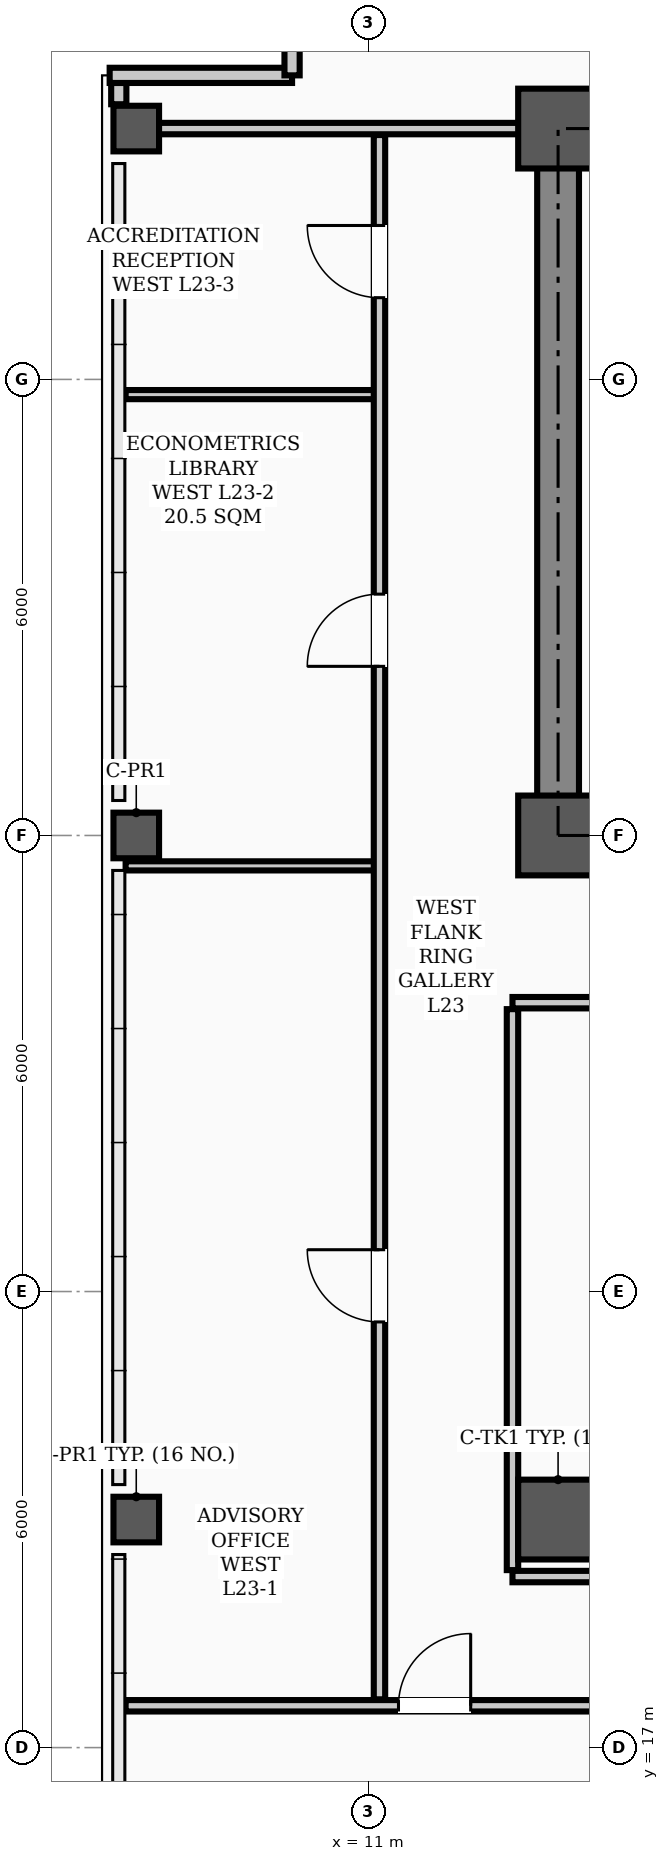
"""IFC4 building model, lengths in metres.
Left out: names, types, materials, properties, quantities, classifications, styles, units other than length and angle.
Written with IfcOpenShell. Run it as: python <this file> out.ifc"""

import sys

from ifc_helpers import new_model, si_unit, direction, frame, frame_2d, origin, origin_2d, place, context, subcontext, project, spatial, rectangle, hollow_rectangle, extrude, element, fill, save


model = new_model("IFC4")
c1 = context("Model", 3, precision=1e-05, world=origin(), true_north=direction((0.0, 1.0)))
c2 = subcontext(c1, "Body", "Model", "MODEL_VIEW")
j1 = project(units=[si_unit("LENGTHUNIT", "METRE"), si_unit("PLANEANGLEUNIT", "RADIAN")], contexts=[c1])
p1 = place(None, origin())
s1 = spatial("IfcSite", under=j1, at=p1, CompositionType="ELEMENT")
p2 = place(p1, origin())
s2 = spatial("IfcBuilding", under=s1, at=p2, CompositionType="ELEMENT")
p3 = place(p2, frame((0.0, 0.0, 92.8)))
s3 = spatial("IfcBuildingStorey", under=s2, at=p3, CompositionType="ELEMENT", Elevation=92.8)
for number, where, z_axis, x_axis in (
    (1, (13.5, 29.0, 0.0), (0.0, 0.0, 1.0), (1.0, 0.0, 0.0)),
    (2, (13.5, 38.3, 0.0), (0.0, 0.0, 1.0), (1.0, 0.0, 0.0)),
    (3, (13.5, 20.0, 0.0), (0.0, 0.0, 1.0), (1.0, 0.0, 0.0)),
):
    element("IfcColumn", number, at=place(p3, frame(where, z_axis=z_axis, x_axis=x_axis)), inside=s3, PredefinedType="COLUMN", context=c2, shape_type="SweptSolid", body=[
        extrude(hollow_rectangle(XDim=1.05, YDim=1.05, WallThickness=0.038, InnerFilletRadius=0.019, OuterFilletRadius=0.057, at=origin_2d()), origin(), (0.0, 0.0, 1.0), 3.9),
    ])
for number, where, z_axis, x_axis in (
    (4, (7.95, 20.0, 0.0), (0.0, 0.0, 1.0), (1.0, 0.0, 0.0)),
    (5, (7.95, 29.0, 0.0), (0.0, 0.0, 1.0), (1.0, 0.0, 0.0)),
    (6, (7.95, 38.3, 0.0), (0.0, 0.0, 1.0), (1.0, 0.0, 0.0)),
):
    element("IfcColumn", number, at=place(p3, frame(where, z_axis=z_axis, x_axis=x_axis)), inside=s3, PredefinedType="COLUMN", context=c2, shape_type="SweptSolid", body=[
        extrude(hollow_rectangle(XDim=0.6, YDim=0.6, WallThickness=0.026, InnerFilletRadius=0.013, OuterFilletRadius=0.039, at=origin_2d()), origin(), (0.0, 0.0, 1.0), 3.9),
    ])
p4 = place(p3, frame((7.72, 38.62, 0.0), z_axis=(0.0, 0.0, 1.0), x_axis=(0.0, 1.0, 0.0)))
e7 = element("IfcWall", 7, at=p4, inside=s3, PredefinedType="PARAPET", context=c2, shape_type="SweptSolid", body=[
    extrude(rectangle(XDim=0.28, YDim=0.2, at=frame_2d((0.14, 0.0))), origin(), (0.0, 0.0, 1.0), 1.2),
])
for number, where, z_axis, x_axis in (
    (8, (7.6, 39.0, 0.0), (0.0, 0.0, 1.0), (1.0, 0.0, 0.0)),
    (9, (10.0, 39.0, 0.0), (0.0, 0.0, 1.0), (0.0, 1.0, 0.0)),
):
    element("IfcWall", number, at=place(p3, frame(where, z_axis=z_axis, x_axis=x_axis)), inside=s3, PredefinedType="PARAPET", context=c2, shape_type="SweptSolid", body=[
        extrude(rectangle(XDim=2.4, YDim=0.2, at=frame_2d((1.2, 0.0))), origin(), (0.0, 0.0, 1.0), 1.2),
    ])
p5 = place(p3, frame((13.5, 29.0, 0.0), z_axis=(0.0, 0.0, 1.0), x_axis=(1.0, 0.0, 0.0)))
e10 = element("IfcWall", 10, at=p5, inside=s3, PredefinedType="SHEAR", context=c2, shape_type="SweptSolid", body=[
    extrude(rectangle(XDim=30.5, YDim=0.55, at=frame_2d((15.25, 0.0))), origin(), (0.0, 0.0, 1.0), 3.72),
])
p6 = place(p5, frame((1.75, 0.0, 0.0)))
e11 = element("IfcOpeningElement", 11, at=p6, cuts=e10, PredefinedType="OPENING", context=c2, shape_type="SweptSolid", body=[
    extrude(rectangle(XDim=1.1, YDim=2.08, at=frame_2d((0.55, 1.04))), frame((0.0, 0.285, 0.0), z_axis=(0.0, -1.0, 0.0), x_axis=(1.0, 0.0, 0.0)), (0.0, 0.0, 1.0), 0.57),
])
p7 = place(p5, frame((26.7, 0.0, 0.0)))
e12 = element("IfcOpeningElement", 12, at=p7, cuts=e10, PredefinedType="OPENING", context=c2, shape_type="SweptSolid", body=[
    extrude(rectangle(XDim=1.1, YDim=2.08, at=frame_2d((0.55, 1.04))), frame((0.0, 0.285, 0.0), z_axis=(0.0, -1.0, 0.0), x_axis=(1.0, 0.0, 0.0)), (0.0, 0.0, 1.0), 0.57),
])
p8 = place(p5, frame((6.8, 0.0, 0.0)))
e13 = element("IfcOpeningElement", 13, at=p8, cuts=e10, PredefinedType="OPENING", context=c2, shape_type="SweptSolid", body=[
    extrude(rectangle(XDim=1.1, YDim=2.08, at=frame_2d((0.55, 1.04))), frame((0.0, 0.285, 0.0), z_axis=(0.0, -1.0, 0.0), x_axis=(1.0, 0.0, 0.0)), (0.0, 0.0, 1.0), 0.57),
])
p9 = place(p5, frame((13.2, 0.0, 0.0)))
e14 = element("IfcOpeningElement", 14, at=p9, cuts=e10, PredefinedType="OPENING", context=c2, shape_type="SweptSolid", body=[
    extrude(rectangle(XDim=1.6, YDim=2.08, at=frame_2d((0.8, 1.04))), frame((0.0, 0.285, 0.0), z_axis=(0.0, -1.0, 0.0), x_axis=(1.0, 0.0, 0.0)), (0.0, 0.0, 1.0), 0.57),
])
p10 = place(p5, frame((19.6, 0.0, 0.0)))
e15 = element("IfcOpeningElement", 15, at=p10, cuts=e10, PredefinedType="OPENING", context=c2, shape_type="SweptSolid", body=[
    extrude(rectangle(XDim=0.9, YDim=2.08, at=frame_2d((0.45, 1.04))), frame((0.0, 0.285, 0.0), z_axis=(0.0, -1.0, 0.0), x_axis=(1.0, 0.0, 0.0)), (0.0, 0.0, 1.0), 0.57),
])
p11 = place(p5, frame((21.6, 0.0, 0.0)))
e16 = element("IfcOpeningElement", 16, at=p11, cuts=e10, PredefinedType="OPENING", context=c2, shape_type="SweptSolid", body=[
    extrude(rectangle(XDim=0.9, YDim=2.08, at=frame_2d((0.45, 1.04))), frame((0.0, 0.285, 0.0), z_axis=(0.0, -1.0, 0.0), x_axis=(1.0, 0.0, 0.0)), (0.0, 0.0, 1.0), 0.57),
])
p12 = place(p3, frame((13.5, 38.3, 0.0), z_axis=(0.0, 0.0, 1.0), x_axis=(1.0, 0.0, 0.0)))
e17 = element("IfcWall", 17, at=p12, inside=s3, PredefinedType="SHEAR", context=c2, shape_type="SweptSolid", body=[
    extrude(rectangle(XDim=30.5, YDim=0.55, at=frame_2d((15.25, 0.0))), origin(), (0.0, 0.0, 1.0), 3.72),
])
p13 = place(p3, frame((13.5, 29.35, 0.0), z_axis=(0.0, 0.0, 1.0), x_axis=(0.0, 1.0, 0.0)))
e18 = element("IfcWall", 18, at=p13, inside=s3, PredefinedType="SHEAR", context=c2, shape_type="SweptSolid", body=[
    extrude(rectangle(XDim=8.6, YDim=0.55, at=frame_2d((4.3, 0.0))), origin(), (0.0, 0.0, 1.0), 3.72),
])
p14 = place(p3, frame((12.9, 26.8, 0.0), z_axis=(0.0, 0.0, 1.0), x_axis=(1.0, 0.0, 0.0)))
e19 = element("IfcWall", 19, at=p14, inside=s3, PredefinedType="PARTITIONING", context=c2, shape_type="SweptSolid", body=[
    extrude(rectangle(XDim=31.7, YDim=0.15, at=frame_2d((15.85, 0.0))), origin(), (0.0, 0.0, 1.0), 3.1),
])
p15 = place(p14, frame((13.6, 0.0, 0.0)))
e20 = element("IfcOpeningElement", 20, at=p15, cuts=e19, PredefinedType="OPENING", context=c2, shape_type="SweptSolid", body=[
    extrude(rectangle(XDim=1.6, YDim=2.08, at=frame_2d((0.8, 1.04))), frame((0.0, 0.085, 0.0), z_axis=(0.0, -1.0, 0.0), x_axis=(1.0, 0.0, 0.0)), (0.0, 0.0, 1.0), 0.17),
])
p16 = place(p14, frame((2.075, 0.0, 0.0)))
e21 = element("IfcOpeningElement", 21, at=p16, cuts=e19, PredefinedType="OPENING", context=c2, shape_type="SweptSolid", body=[
    extrude(rectangle(XDim=0.95, YDim=2.08, at=frame_2d((0.475, 1.04))), frame((0.0, 0.085, 0.0), z_axis=(0.0, -1.0, 0.0), x_axis=(1.0, 0.0, 0.0)), (0.0, 0.0, 1.0), 0.17),
])
p17 = place(p14, frame((6.925, 0.0, 0.0)))
e22 = element("IfcOpeningElement", 22, at=p17, cuts=e19, PredefinedType="OPENING", context=c2, shape_type="SweptSolid", body=[
    extrude(rectangle(XDim=0.95, YDim=2.08, at=frame_2d((0.475, 1.04))), frame((0.0, 0.085, 0.0), z_axis=(0.0, -1.0, 0.0), x_axis=(1.0, 0.0, 0.0)), (0.0, 0.0, 1.0), 0.17),
])
p18 = place(p14, frame((11.025, 0.0, 0.0)))
e23 = element("IfcOpeningElement", 23, at=p18, cuts=e19, PredefinedType="OPENING", context=c2, shape_type="SweptSolid", body=[
    extrude(rectangle(XDim=0.95, YDim=2.08, at=frame_2d((0.475, 1.04))), frame((0.0, 0.085, 0.0), z_axis=(0.0, -1.0, 0.0), x_axis=(1.0, 0.0, 0.0)), (0.0, 0.0, 1.0), 0.17),
])
p19 = place(p14, frame((16.075, 0.0, 0.0)))
e24 = element("IfcOpeningElement", 24, at=p19, cuts=e19, PredefinedType="OPENING", context=c2, shape_type="SweptSolid", body=[
    extrude(rectangle(XDim=0.95, YDim=2.08, at=frame_2d((0.475, 1.04))), frame((0.0, 0.085, 0.0), z_axis=(0.0, -1.0, 0.0), x_axis=(1.0, 0.0, 0.0)), (0.0, 0.0, 1.0), 0.17),
])
p20 = place(p14, frame((22.025, 0.0, 0.0)))
e25 = element("IfcOpeningElement", 25, at=p20, cuts=e19, PredefinedType="OPENING", context=c2, shape_type="SweptSolid", body=[
    extrude(rectangle(XDim=0.95, YDim=2.08, at=frame_2d((0.475, 1.04))), frame((0.0, 0.085, 0.0), z_axis=(0.0, -1.0, 0.0), x_axis=(1.0, 0.0, 0.0)), (0.0, 0.0, 1.0), 0.17),
])
p21 = place(p14, frame((28.525, 0.0, 0.0)))
e26 = element("IfcOpeningElement", 26, at=p21, cuts=e19, PredefinedType="OPENING", context=c2, shape_type="SweptSolid", body=[
    extrude(rectangle(XDim=0.95, YDim=2.08, at=frame_2d((0.475, 1.04))), frame((0.0, 0.085, 0.0), z_axis=(0.0, -1.0, 0.0), x_axis=(1.0, 0.0, 0.0)), (0.0, 0.0, 1.0), 0.17),
])
p22 = place(p3, frame((7.81, 17.55, 0.0), z_axis=(0.0, 0.0, 1.0), x_axis=(1.0, 0.0, 0.0)))
e27 = element("IfcWall", 27, at=p22, inside=s3, PredefinedType="PARTITIONING", context=c2, shape_type="SweptSolid", body=[
    extrude(rectangle(XDim=49.38, YDim=0.15, at=frame_2d((24.69, 0.0))), origin(), (0.0, 0.0, 1.0), 3.1),
])
p23 = place(p22, frame((3.59, 0.0, 0.0)))
e28 = element("IfcOpeningElement", 28, at=p23, cuts=e27, PredefinedType="OPENING", context=c2, shape_type="SweptSolid", body=[
    extrude(rectangle(XDim=0.95, YDim=2.08, at=frame_2d((0.475, 1.04))), frame((0.0, 0.085, 0.0), z_axis=(0.0, -1.0, 0.0), x_axis=(1.0, 0.0, 0.0)), (0.0, 0.0, 1.0), 0.17),
])
p24 = place(p22, frame((10.115, 0.0, 0.0)))
e29 = element("IfcOpeningElement", 29, at=p24, cuts=e27, PredefinedType="OPENING", context=c2, shape_type="SweptSolid", body=[
    extrude(rectangle(XDim=0.95, YDim=2.08, at=frame_2d((0.475, 1.04))), frame((0.0, 0.085, 0.0), z_axis=(0.0, -1.0, 0.0), x_axis=(1.0, 0.0, 0.0)), (0.0, 0.0, 1.0), 0.17),
])
p25 = place(p22, frame((18.615, 0.0, 0.0)))
e30 = element("IfcOpeningElement", 30, at=p25, cuts=e27, PredefinedType="OPENING", context=c2, shape_type="SweptSolid", body=[
    extrude(rectangle(XDim=0.95, YDim=2.08, at=frame_2d((0.475, 1.04))), frame((0.0, 0.085, 0.0), z_axis=(0.0, -1.0, 0.0), x_axis=(1.0, 0.0, 0.0)), (0.0, 0.0, 1.0), 0.17),
])
p26 = place(p22, frame((27.315, 0.0, 0.0)))
e31 = element("IfcOpeningElement", 31, at=p26, cuts=e27, PredefinedType="OPENING", context=c2, shape_type="SweptSolid", body=[
    extrude(rectangle(XDim=0.95, YDim=2.08, at=frame_2d((0.475, 1.04))), frame((0.0, 0.085, 0.0), z_axis=(0.0, -1.0, 0.0), x_axis=(1.0, 0.0, 0.0)), (0.0, 0.0, 1.0), 0.17),
])
p27 = place(p22, frame((33.89, 0.0, 0.0)))
e32 = element("IfcOpeningElement", 32, at=p27, cuts=e27, PredefinedType="OPENING", context=c2, shape_type="SweptSolid", body=[
    extrude(rectangle(XDim=0.95, YDim=2.08, at=frame_2d((0.475, 1.04))), frame((0.0, 0.085, 0.0), z_axis=(0.0, -1.0, 0.0), x_axis=(1.0, 0.0, 0.0)), (0.0, 0.0, 1.0), 0.17),
])
p28 = place(p3, frame((12.9, 19.25, 0.0), z_axis=(0.0, 0.0, 1.0), x_axis=(1.0, 0.0, 0.0)))
e33 = element("IfcWall", 33, at=p28, inside=s3, PredefinedType="PARTITIONING", context=c2, shape_type="SweptSolid", body=[
    extrude(rectangle(XDim=13.3, YDim=0.15, at=frame_2d((6.65, 0.0))), origin(), (0.0, 0.0, 1.0), 3.1),
])
p29 = place(p3, frame((7.81, 38.3, 0.0), z_axis=(0.0, 0.0, 1.0), x_axis=(1.0, 0.0, 0.0)))
e34 = element("IfcWall", 34, at=p29, inside=s3, PredefinedType="PARTITIONING", context=c2, shape_type="SweptSolid", body=[
    extrude(rectangle(XDim=5.69, YDim=0.15, at=frame_2d((2.845, 0.0))), origin(), (0.0, 0.0, 1.0), 3.0),
])
p30 = place(p3, frame((7.81, 28.6, 0.0), z_axis=(0.0, 0.0, 1.0), x_axis=(1.0, 0.0, 0.0)))
e35 = element("IfcWall", 35, at=p30, inside=s3, PredefinedType="PARTITIONING", context=c2, shape_type="SweptSolid", body=[
    extrude(rectangle(XDim=3.34, YDim=0.12, at=frame_2d((1.67, 0.0))), origin(), (0.0, 0.0, 1.0), 3.0),
])
p31 = place(p3, frame((7.81, 34.8, 0.0), z_axis=(0.0, 0.0, 1.0), x_axis=(1.0, 0.0, 0.0)))
e36 = element("IfcWall", 36, at=p31, inside=s3, PredefinedType="PARTITIONING", context=c2, shape_type="SweptSolid", body=[
    extrude(rectangle(XDim=3.34, YDim=0.12, at=frame_2d((1.67, 0.0))), origin(), (0.0, 0.0, 1.0), 3.212),
])
p32 = place(p3, frame((11.15, 17.635, 0.0), z_axis=(0.0, 0.0, 1.0), x_axis=(0.0, 1.0, 0.0)))
e37 = element("IfcWall", 37, at=p32, inside=s3, PredefinedType="PARTITIONING", context=c2, shape_type="SweptSolid", body=[
    extrude(rectangle(XDim=20.58, YDim=0.15, at=frame_2d((10.29, 0.0))), origin(), (0.0, 0.0, 1.0), 3.0),
])
p33 = place(p32, frame((4.965, 0.0, 0.0)))
e38 = element("IfcOpeningElement", 38, at=p33, cuts=e37, PredefinedType="OPENING", context=c2, shape_type="SweptSolid", body=[
    extrude(rectangle(XDim=0.95, YDim=2.08, at=frame_2d((0.475, 1.04))), frame((0.0, 0.085, 0.0), z_axis=(0.0, -1.0, 0.0), x_axis=(1.0, 0.0, 0.0)), (0.0, 0.0, 1.0), 0.17),
])
p34 = place(p32, frame((13.59, 0.0, 0.0)))
e39 = element("IfcOpeningElement", 39, at=p34, cuts=e37, PredefinedType="OPENING", context=c2, shape_type="SweptSolid", body=[
    extrude(rectangle(XDim=0.95, YDim=2.08, at=frame_2d((0.475, 1.04))), frame((0.0, 0.085, 0.0), z_axis=(0.0, -1.0, 0.0), x_axis=(1.0, 0.0, 0.0)), (0.0, 0.0, 1.0), 0.17),
])
p35 = place(p32, frame((18.44, 0.0, 0.0)))
e40 = element("IfcOpeningElement", 40, at=p35, cuts=e37, PredefinedType="OPENING", context=c2, shape_type="SweptSolid", body=[
    extrude(rectangle(XDim=0.95, YDim=2.08, at=frame_2d((0.475, 1.04))), frame((0.0, 0.085, 0.0), z_axis=(0.0, -1.0, 0.0), x_axis=(1.0, 0.0, 0.0)), (0.0, 0.0, 1.0), 0.17),
])
p36 = place(p3, frame((12.9, 19.335, 0.0), z_axis=(0.0, 0.0, 1.0), x_axis=(0.0, 1.0, 0.0)))
e41 = element("IfcWall", 41, at=p36, inside=s3, PredefinedType="PARTITIONING", context=c2, shape_type="SweptSolid", body=[
    extrude(rectangle(XDim=7.38, YDim=0.15, at=frame_2d((3.69, 0.0))), origin(), (0.0, 0.0, 1.0), 3.0),
])
p37 = place(p23, origin())
e42 = element("IfcDoor", 42, at=p37, inside=s3, OperationType="SINGLE_SWING_RIGHT", PredefinedType="DOOR", context=c2, shape_type="SweptSolid", body=[
    extrude(rectangle(XDim=0.95, YDim=2.08, at=frame_2d((0.475, 1.04))), frame((0.0, 0.025, 0.0), z_axis=(0.0, -1.0, 0.0), x_axis=(1.0, 0.0, 0.0)), (0.0, 0.0, 1.0), 0.05),
])
fill(e28, e42)
p38 = place(p33, origin())
e43 = element("IfcDoor", 43, at=p38, inside=s3, OperationType="SINGLE_SWING_RIGHT", PredefinedType="DOOR", context=c2, shape_type="SweptSolid", body=[
    extrude(rectangle(XDim=0.95, YDim=2.08, at=frame_2d((0.475, 1.04))), frame((0.0, 0.025, 0.0), z_axis=(0.0, -1.0, 0.0), x_axis=(1.0, 0.0, 0.0)), (0.0, 0.0, 1.0), 0.05),
])
fill(e38, e43)
p39 = place(p34, origin())
e44 = element("IfcDoor", 44, at=p39, inside=s3, OperationType="SINGLE_SWING_LEFT", PredefinedType="DOOR", context=c2, shape_type="SweptSolid", body=[
    extrude(rectangle(XDim=0.95, YDim=2.08, at=frame_2d((0.475, 1.04))), frame((0.0, 0.025, 0.0), z_axis=(0.0, -1.0, 0.0), x_axis=(1.0, 0.0, 0.0)), (0.0, 0.0, 1.0), 0.05),
])
fill(e39, e44)
p40 = place(p35, origin())
e45 = element("IfcDoor", 45, at=p40, inside=s3, OperationType="SINGLE_SWING_RIGHT", PredefinedType="DOOR", context=c2, shape_type="SweptSolid", body=[
    extrude(rectangle(XDim=0.95, YDim=2.08, at=frame_2d((0.475, 1.04))), frame((0.0, 0.025, 0.0), z_axis=(0.0, -1.0, 0.0), x_axis=(1.0, 0.0, 0.0)), (0.0, 0.0, 1.0), 0.05),
])
fill(e40, e45)
save(model, sys.argv[1])
